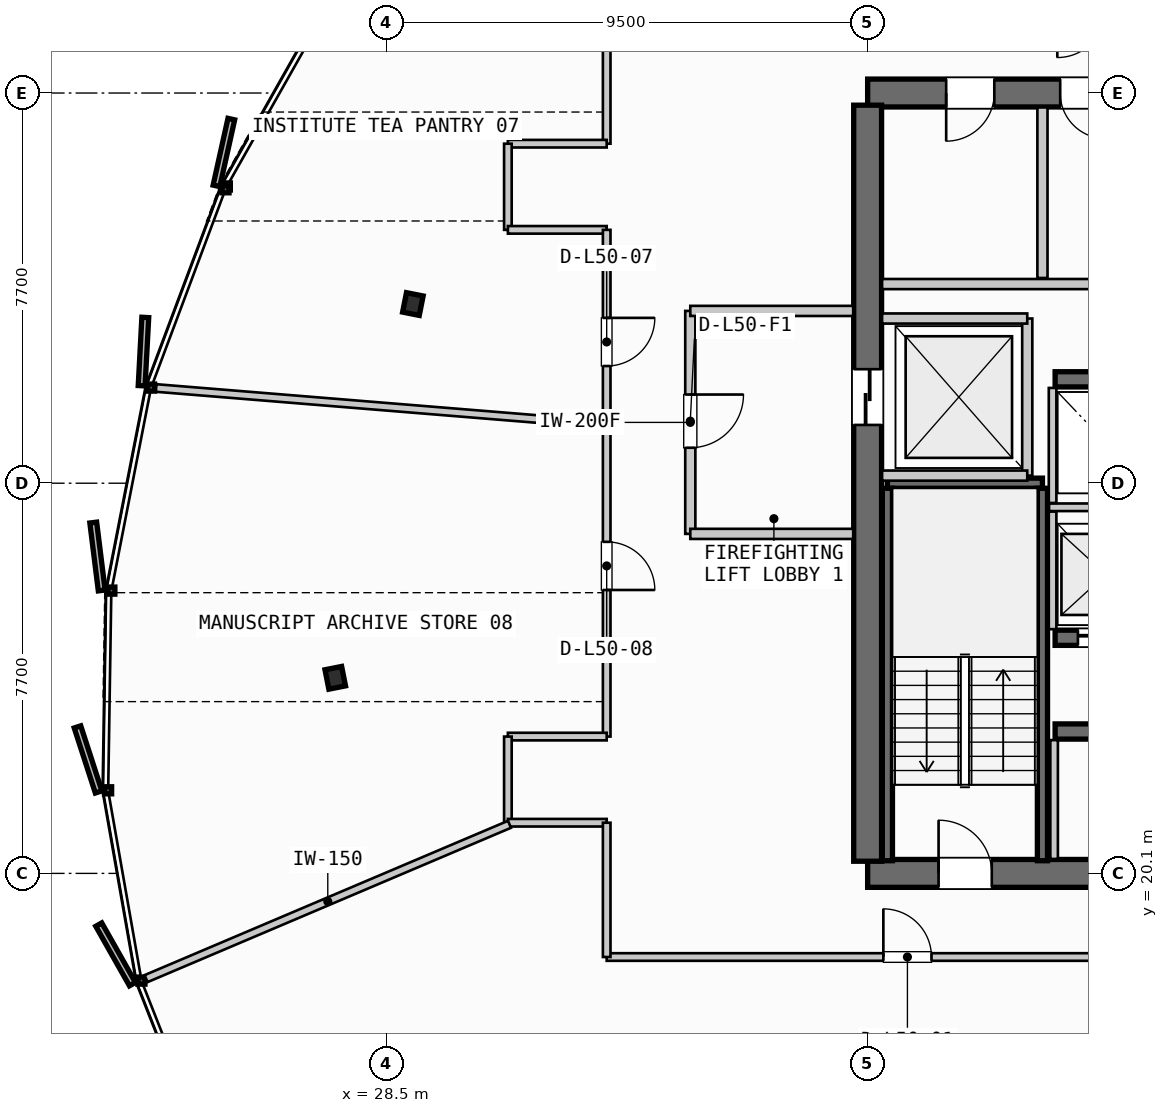
"""IFC4 building model, lengths in metres.
Left out: names, types, materials, properties, quantities, classifications, styles, units other than length and angle.
Written with IfcOpenShell. Run it as: python <this file> out.ifc"""

import sys

from ifc_helpers import new_model, si_unit, direction, frame, frame_2d, origin, origin_2d, place, context, subcontext, project, spatial, rectangle, i_section, extrude, source, transform, mapped, element, fill, save


model = new_model("IFC4")
c1 = context("Model", 3, precision=1e-05, world=origin(), true_north=direction((0.0, 1.0)))
c2 = subcontext(c1, "Body", "Model", "MODEL_VIEW")
j1 = project(units=[si_unit("LENGTHUNIT", "METRE"), si_unit("PLANEANGLEUNIT", "RADIAN")], contexts=[c1])
p1 = place(None, origin())
s1 = spatial("IfcSite", under=j1, at=p1, CompositionType="ELEMENT")
p2 = place(p1, origin())
s2 = spatial("IfcBuilding", under=s1, at=p2, CompositionType="ELEMENT")
p3 = place(p2, frame((0.0, 0.0, 193.9)))
s3 = spatial("IfcBuildingStorey", under=s2, at=p3, CompositionType="ELEMENT", Elevation=193.9)
p4 = place(p3, frame((38.0, 20.1, 0.0), z_axis=(0.0, 0.0, 1.0), x_axis=(1.0, 0.0, 0.0)))
e1 = element("IfcWall", 1, at=p4, inside=s3, PredefinedType="SHEAR", context=c2, shape_type="SweptSolid", body=[
    extrude(rectangle(XDim=17.6, YDim=0.55, at=frame_2d((8.8, 0.0))), origin(), (0.0, 0.0, 1.0), 3.26),
])
p5 = place(p4, frame((1.4, 0.0, 0.0)))
e2 = element("IfcOpeningElement", 2, at=p5, cuts=e1, PredefinedType="OPENING", context=c2, shape_type="SweptSolid", body=[
    extrude(rectangle(XDim=1.05, YDim=2.15, at=frame_2d((0.525, 1.075))), frame((0.0, 0.285, 0.0), z_axis=(0.0, -1.0, 0.0), x_axis=(1.0, 0.0, 0.0)), (0.0, 0.0, 1.0), 0.57),
])
p6 = place(p4, frame((15.15, 0.0, 0.0)))
e3 = element("IfcOpeningElement", 3, at=p6, cuts=e1, PredefinedType="OPENING", context=c2, shape_type="SweptSolid", body=[
    extrude(rectangle(XDim=1.05, YDim=2.15, at=frame_2d((0.525, 1.075))), frame((0.0, 0.285, 0.0), z_axis=(0.0, -1.0, 0.0), x_axis=(1.0, 0.0, 0.0)), (0.0, 0.0, 1.0), 0.57),
])
p7 = place(p4, frame((5.25, 0.0, 0.0)))
e4 = element("IfcOpeningElement", 4, at=p7, cuts=e1, PredefinedType="OPENING", context=c2, shape_type="SweptSolid", body=[
    extrude(rectangle(XDim=0.9, YDim=2.15, at=frame_2d((0.45, 1.075))), frame((0.0, 0.285, 0.0), z_axis=(0.0, -1.0, 0.0), x_axis=(1.0, 0.0, 0.0)), (0.0, 0.0, 1.0), 0.57),
])
p8 = place(p4, frame((11.4, 0.0, 0.0)))
e5 = element("IfcOpeningElement", 5, at=p8, cuts=e1, PredefinedType="OPENING", context=c2, shape_type="SweptSolid", body=[
    extrude(rectangle(XDim=0.95, YDim=2.15, at=frame_2d((0.475, 1.075))), frame((0.0, 0.285, 0.0), z_axis=(0.0, -1.0, 0.0), x_axis=(1.0, 0.0, 0.0)), (0.0, 0.0, 1.0), 0.57),
])
p9 = place(p3, frame((55.6, 35.5, 0.0), z_axis=(0.0, 0.0, 1.0), x_axis=(-1.0, 0.0, 0.0)))
e6 = element("IfcWall", 6, at=p9, inside=s3, PredefinedType="SHEAR", context=c2, shape_type="SweptSolid", body=[
    extrude(rectangle(XDim=17.6, YDim=0.55, at=frame_2d((8.8, 0.0))), origin(), (0.0, 0.0, 1.0), 3.26),
])
p10 = place(p9, frame((8.05, 0.0, 0.0)))
e7 = element("IfcOpeningElement", 7, at=p10, cuts=e6, PredefinedType="OPENING", context=c2, shape_type="SweptSolid", body=[
    extrude(rectangle(XDim=1.5, YDim=2.2, at=frame_2d((0.75, 1.1))), frame((0.0, 0.285, 0.0), z_axis=(0.0, -1.0, 0.0), x_axis=(1.0, 0.0, 0.0)), (0.0, 0.0, 1.0), 0.57),
])
p11 = place(p9, frame((15.1, 0.0, 0.0)))
e8 = element("IfcOpeningElement", 8, at=p11, cuts=e6, PredefinedType="OPENING", context=c2, shape_type="SweptSolid", body=[
    extrude(rectangle(XDim=0.95, YDim=2.15, at=frame_2d((0.475, 1.075))), frame((0.0, 0.285, 0.0), z_axis=(0.0, -1.0, 0.0), x_axis=(1.0, 0.0, 0.0)), (0.0, 0.0, 1.0), 0.57),
])
p12 = place(p9, frame((12.9, 0.0, 0.0)))
e9 = element("IfcOpeningElement", 9, at=p12, cuts=e6, PredefinedType="OPENING", context=c2, shape_type="SweptSolid", body=[
    extrude(rectangle(XDim=0.9, YDim=2.15, at=frame_2d((0.45, 1.075))), frame((0.0, 0.285, 0.0), z_axis=(0.0, -1.0, 0.0), x_axis=(1.0, 0.0, 0.0)), (0.0, 0.0, 1.0), 0.57),
])
p13 = place(p9, frame((10.6, 0.0, 0.0)))
e10 = element("IfcOpeningElement", 10, at=p13, cuts=e6, PredefinedType="OPENING", context=c2, shape_type="SweptSolid", body=[
    extrude(rectangle(XDim=0.95, YDim=2.15, at=frame_2d((0.475, 1.075))), frame((0.0, 0.285, 0.0), z_axis=(0.0, -1.0, 0.0), x_axis=(1.0, 0.0, 0.0)), (0.0, 0.0, 1.0), 0.57),
])
p14 = place(p3, frame((38.0, 35.26, 0.0), z_axis=(0.0, 0.0, 1.0), x_axis=(0.0, -1.0, 0.0)))
e11 = element("IfcWall", 11, at=p14, inside=s3, PredefinedType="SHEAR", context=c2, shape_type="SweptSolid", body=[
    extrude(rectangle(XDim=14.92, YDim=0.55, at=frame_2d((7.46, 0.0))), origin(), (0.0, 0.0, 1.0), 3.26),
])
p15 = place(p14, frame((5.21, 0.0, 0.0)))
e12 = element("IfcOpeningElement", 12, at=p15, cuts=e11, PredefinedType="OPENING", context=c2, shape_type="SweptSolid", body=[
    extrude(rectangle(XDim=1.1, YDim=2.2, at=frame_2d((0.55, 1.1))), frame((0.0, 0.285, 0.0), z_axis=(0.0, -1.0, 0.0), x_axis=(1.0, 0.0, 0.0)), (0.0, 0.0, 1.0), 0.57),
])
p16 = place(p3, frame((41.7, 22.9, 0.0), z_axis=(0.0, 0.0, 1.0), x_axis=(1.0, 0.0, 0.0)))
e13 = element("IfcWall", 13, at=p16, inside=s3, PredefinedType="SHEAR", context=c2, shape_type="SweptSolid", body=[
    extrude(rectangle(XDim=4.25, YDim=0.3, at=frame_2d((2.125, 0.0))), origin(), (0.0, 0.0, 1.0), 3.26),
])
p17 = place(p3, frame((41.7, 24.75, 0.0), z_axis=(0.0, 0.0, 1.0), x_axis=(1.0, 0.0, 0.0)))
e14 = element("IfcWall", 14, at=p17, inside=s3, PredefinedType="SHEAR", context=c2, shape_type="SweptSolid", body=[
    extrude(rectangle(XDim=4.25, YDim=0.3, at=frame_2d((2.125, 0.0))), origin(), (0.0, 0.0, 1.0), 3.26),
])
p18 = place(p17, frame((0.45, 0.0, 0.0)))
e15 = element("IfcOpeningElement", 15, at=p18, cuts=e14, PredefinedType="OPENING", context=c2, shape_type="SweptSolid", body=[
    extrude(rectangle(XDim=1.1, YDim=2.2, at=frame_2d((0.55, 1.1))), frame((0.0, 0.16, 0.0), z_axis=(0.0, -1.0, 0.0), x_axis=(1.0, 0.0, 0.0)), (0.0, 0.0, 1.0), 0.32),
])
p19 = place(p17, frame((2.5, 0.0, 0.0)))
e16 = element("IfcOpeningElement", 16, at=p19, cuts=e14, PredefinedType="OPENING", context=c2, shape_type="SweptSolid", body=[
    extrude(rectangle(XDim=1.1, YDim=2.2, at=frame_2d((0.55, 1.1))), frame((0.0, 0.16, 0.0), z_axis=(0.0, -1.0, 0.0), x_axis=(1.0, 0.0, 0.0)), (0.0, 0.0, 1.0), 0.32),
])
p20 = place(p3, frame((41.7, 29.85, 0.0), z_axis=(0.0, 0.0, 1.0), x_axis=(1.0, 0.0, 0.0)))
e17 = element("IfcWall", 17, at=p20, inside=s3, PredefinedType="SHEAR", context=c2, shape_type="SweptSolid", body=[
    extrude(rectangle(XDim=4.25, YDim=0.3, at=frame_2d((2.125, 0.0))), origin(), (0.0, 0.0, 1.0), 3.26),
])
m1 = source(origin(), c2, "Body", "SweptSolid", [
    extrude(i_section(OverallWidth=0.391, OverallDepth=0.335, WebThickness=0.023, FlangeThickness=0.034, FilletRadius=0.015, at=origin_2d()), origin(), (0.0, 0.0, 1.0), 3.26),
])
for number, where, z_axis, x_axis in (
    (18, (29.025, 31.336, 0.0), (0.0, 0.0, 1.0), (-0.981, 0.195, 0.0)),
    (19, (27.493, 23.96, 0.0), (0.0, 0.0, 1.0), (-0.981, -0.195, 0.0)),
):
    element("IfcColumn", number, at=place(p3, frame(where, z_axis=z_axis, x_axis=x_axis)), inside=s3, PredefinedType="COLUMN", context=c2, shape_type="MappedRepresentation", body=[
        mapped(m1, transform((0.0, 0.0, 0.0), scale=1.0)),
    ])
p21 = place(p3, frame((38.39, 27.8, 0.0), z_axis=(0.0, 0.0, 1.0), x_axis=(1.0, 0.0, 0.0)))
e20 = element("IfcWall", 20, at=p21, inside=s3, PredefinedType="SHEAR", context=c2, shape_type="SweptSolid", body=[
    extrude(rectangle(XDim=3.06, YDim=0.2, at=frame_2d((1.53, 0.0))), origin(), (0.0, 0.0, 1.0), 3.26),
])
for number, where, z_axis, x_axis in (
    (21, (41.45, 27.7, 0.0), (0.0, 0.0, 1.0), (0.0, -1.0, 0.0)),
    (22, (38.39, 20.35, 0.0), (0.0, 0.0, 1.0), (0.0, 1.0, 0.0)),
):
    element("IfcWall", number, at=place(p3, frame(where, z_axis=z_axis, x_axis=x_axis)), inside=s3, PredefinedType="SHEAR", context=c2, shape_type="SweptSolid", body=[
        extrude(rectangle(XDim=7.35, YDim=0.2, at=frame_2d((3.675, 0.0))), origin(), (0.0, 0.0, 1.0), 3.26),
    ])
p22 = place(p3, frame((41.15, 27.95, 0.0), z_axis=(0.0, 0.0, 1.0), x_axis=(0.0, 1.0, 0.0)))
e23 = element("IfcWall", 23, at=p22, inside=s3, PredefinedType="PARTITIONING", context=c2, shape_type="SweptSolid", body=[
    extrude(rectangle(XDim=3.1, YDim=0.2, at=frame_2d((1.55, 0.0))), origin(), (0.0, 0.0, 1.0), 2.735),
])
for number, where, z_axis, x_axis in (
    (24, (38.285, 27.95, 0.0), (0.0, 0.0, 1.0), (1.0, 0.0, 0.0)),
    (25, (38.285, 31.05, 0.0), (0.0, 0.0, 1.0), (1.0, 0.0, 0.0)),
):
    element("IfcWall", number, at=place(p3, frame(where, z_axis=z_axis, x_axis=x_axis)), inside=s3, PredefinedType="PARTITIONING", context=c2, shape_type="SweptSolid", body=[
        extrude(rectangle(XDim=2.865, YDim=0.2, at=frame_2d((1.433, 0.0))), origin(), (0.0, 0.0, 1.0), 2.735),
    ])
p23 = place(p3, frame((34.5, 31.2, 0.0), z_axis=(0.0, 0.0, 1.0), x_axis=(0.0, -1.0, 0.0)))
e26 = element("IfcWall", 26, at=p23, inside=s3, PredefinedType="PARTITIONING", context=c2, shape_type="SweptSolid", body=[
    extrude(rectangle(XDim=4.4, YDim=0.2, at=frame_2d((2.2, 0.0))), origin(), (0.0, 0.0, 1.0), 2.735),
])
p24 = place(p23, frame((1.65, 0.0, 0.0)))
e27 = element("IfcOpeningElement", 27, at=p24, cuts=e26, PredefinedType="OPENING", context=c2, shape_type="SweptSolid", body=[
    extrude(rectangle(XDim=1.05, YDim=2.15, at=frame_2d((0.525, 1.075))), frame((0.0, 0.11, 0.0), z_axis=(0.0, -1.0, 0.0), x_axis=(1.0, 0.0, 0.0)), (0.0, 0.0, 1.0), 0.22),
])
for number, where, z_axis, x_axis in (
    (28, (34.5, 26.8, 0.0), (0.0, 0.0, 1.0), (1.0, 0.0, 0.0)),
    (29, (34.5, 31.2, 0.0), (0.0, 0.0, 1.0), (1.0, 0.0, 0.0)),
):
    element("IfcWall", number, at=place(p3, frame(where, z_axis=z_axis, x_axis=x_axis)), inside=s3, PredefinedType="PARTITIONING", context=c2, shape_type="SweptSolid", body=[
        extrude(rectangle(XDim=3.215, YDim=0.2, at=frame_2d((1.607, 0.0))), origin(), (0.0, 0.0, 1.0), 2.735),
    ])
p25 = place(p3, frame((41.68, 20.385, 0.0), z_axis=(0.0, 0.0, 1.0), x_axis=(0.0, 1.0, 0.0)))
e30 = element("IfcWall", 30, at=p25, inside=s3, PredefinedType="PARTITIONING", context=c2, shape_type="SweptSolid", body=[
    extrude(rectangle(XDim=2.345, YDim=0.15, at=frame_2d((1.172, 0.0))), origin(), (0.0, 0.0, 1.0), 2.735),
])
p26 = place(p3, frame((41.58, 27.325, 0.0), z_axis=(0.0, 0.0, 1.0), x_axis=(1.0, 0.0, 0.0)))
e31 = element("IfcWall", 31, at=p26, inside=s3, PredefinedType="PARTITIONING", context=c2, shape_type="SweptSolid", body=[
    extrude(rectangle(XDim=4.32, YDim=0.15, at=frame_2d((2.16, 0.0))), origin(), (0.0, 0.0, 1.0), 2.735),
])
p27 = place(p3, frame((41.65, 24.92, 0.0), z_axis=(0.0, 0.0, 1.0), x_axis=(0.0, 1.0, 0.0)))
e32 = element("IfcWall", 32, at=p27, inside=s3, PredefinedType="PARTITIONING", context=c2, shape_type="SweptSolid", body=[
    extrude(rectangle(XDim=2.32, YDim=0.15, at=frame_2d((1.16, 0.0))), origin(), (0.0, 0.0, 1.0), 2.735),
])
p28 = place(p3, frame((41.65, 27.41, 0.0), z_axis=(0.0, 0.0, 1.0), x_axis=(0.0, 1.0, 0.0)))
e33 = element("IfcWall", 33, at=p28, inside=s3, PredefinedType="PARTITIONING", context=c2, shape_type="SweptSolid", body=[
    extrude(rectangle(XDim=2.27, YDim=0.15, at=frame_2d((1.135, 0.0))), origin(), (0.0, 0.0, 1.0), 2.735),
])
p29 = place(p3, frame((41.45, 31.85, 0.0), z_axis=(0.0, 0.0, 1.0), x_axis=(0.0, 1.0, 0.0)))
e34 = element("IfcWall", 34, at=p29, inside=s3, PredefinedType="PARTITIONING", context=c2, shape_type="SweptSolid", body=[
    extrude(rectangle(XDim=3.365, YDim=0.2, at=frame_2d((1.683, 0.0))), origin(), (0.0, 0.0, 1.0), 2.735),
])
p30 = place(p3, frame((38.285, 31.73, 0.0), z_axis=(0.0, 0.0, 1.0), x_axis=(1.0, 0.0, 0.0)))
e35 = element("IfcWall", 35, at=p30, inside=s3, PredefinedType="PARTITIONING", context=c2, shape_type="SweptSolid", body=[
    extrude(rectangle(XDim=7.515, YDim=0.2, at=frame_2d((3.758, 0.0))), origin(), (0.0, 0.0, 1.0), 2.735),
])
p31 = place(p3, frame((32.85, 18.45, 0.0), z_axis=(0.0, 0.0, 1.0), x_axis=(1.0, 0.0, 0.0)))
e36 = element("IfcWall", 36, at=p31, inside=s3, PredefinedType="PARTITIONING", context=c2, shape_type="SweptSolid", body=[
    extrude(rectangle(XDim=28.35, YDim=0.15, at=frame_2d((14.175, 0.0))), origin(), (0.0, 0.0, 1.0), 2.735),
])
p32 = place(p31, frame((5.46, 0.0, 0.0)))
e37 = element("IfcOpeningElement", 37, at=p32, cuts=e36, PredefinedType="OPENING", context=c2, shape_type="SweptSolid", body=[
    extrude(rectangle(XDim=0.95, YDim=2.15, at=frame_2d((0.475, 1.075))), frame((0.0, 0.085, 0.0), z_axis=(0.0, -1.0, 0.0), x_axis=(1.0, 0.0, 0.0)), (0.0, 0.0, 1.0), 0.17),
])
p33 = place(p31, frame((18.165, 0.0, 0.0)))
e38 = element("IfcOpeningElement", 38, at=p33, cuts=e36, PredefinedType="OPENING", context=c2, shape_type="SweptSolid", body=[
    extrude(rectangle(XDim=0.95, YDim=2.15, at=frame_2d((0.475, 1.075))), frame((0.0, 0.085, 0.0), z_axis=(0.0, -1.0, 0.0), x_axis=(1.0, 0.0, 0.0)), (0.0, 0.0, 1.0), 0.17),
])
p34 = place(p3, frame((32.85, 37.15, 0.0), z_axis=(0.0, 0.0, 1.0), x_axis=(0.0, -1.0, 0.0)))
e39 = element("IfcWall", 39, at=p34, inside=s3, PredefinedType="PARTITIONING", context=c2, shape_type="SweptSolid", body=[
    extrude(rectangle(XDim=2.65, YDim=0.15, at=frame_2d((1.325, 0.0))), origin(), (0.0, 0.0, 1.0), 2.735),
])
p35 = place(p3, frame((32.85, 34.5, 0.0), z_axis=(0.0, 0.0, 1.0), x_axis=(-1.0, 0.0, 0.0)))
e40 = element("IfcWall", 40, at=p35, inside=s3, PredefinedType="PARTITIONING", context=c2, shape_type="SweptSolid", body=[
    extrude(rectangle(XDim=1.95, YDim=0.15, at=frame_2d((0.975, 0.0))), origin(), (0.0, 0.0, 1.0), 2.735),
])
p36 = place(p3, frame((30.9, 34.5, 0.0), z_axis=(0.0, 0.0, 1.0), x_axis=(0.0, -1.0, 0.0)))
e41 = element("IfcWall", 41, at=p36, inside=s3, PredefinedType="PARTITIONING", context=c2, shape_type="SweptSolid", body=[
    extrude(rectangle(XDim=1.7, YDim=0.15, at=frame_2d((0.85, 0.0))), origin(), (0.0, 0.0, 1.0), 2.735),
])
p37 = place(p3, frame((30.9, 32.8, 0.0), z_axis=(0.0, 0.0, 1.0), x_axis=(1.0, 0.0, 0.0)))
e42 = element("IfcWall", 42, at=p37, inside=s3, PredefinedType="PARTITIONING", context=c2, shape_type="SweptSolid", body=[
    extrude(rectangle(XDim=1.95, YDim=0.15, at=frame_2d((0.975, 0.0))), origin(), (0.0, 0.0, 1.0), 2.735),
])
p38 = place(p3, frame((32.85, 32.8, 0.0), z_axis=(0.0, 0.0, 1.0), x_axis=(0.0, -1.0, 0.0)))
e43 = element("IfcWall", 43, at=p38, inside=s3, PredefinedType="PARTITIONING", context=c2, shape_type="SweptSolid", body=[
    extrude(rectangle(XDim=10.0, YDim=0.15, at=frame_2d((5.0, 0.0))), origin(), (0.0, 0.0, 1.0), 2.735),
])
p39 = place(p38, frame((1.738, 0.0, 0.0)))
e44 = element("IfcOpeningElement", 44, at=p39, cuts=e43, PredefinedType="OPENING", context=c2, shape_type="SweptSolid", body=[
    extrude(rectangle(XDim=0.95, YDim=2.15, at=frame_2d((0.475, 1.075))), frame((0.0, 0.085, 0.0), z_axis=(0.0, -1.0, 0.0), x_axis=(1.0, 0.0, 0.0)), (0.0, 0.0, 1.0), 0.17),
])
p40 = place(p38, frame((6.157, 0.0, 0.0)))
e45 = element("IfcOpeningElement", 45, at=p40, cuts=e43, PredefinedType="OPENING", context=c2, shape_type="SweptSolid", body=[
    extrude(rectangle(XDim=0.95, YDim=2.15, at=frame_2d((0.475, 1.075))), frame((0.0, 0.085, 0.0), z_axis=(0.0, -1.0, 0.0), x_axis=(1.0, 0.0, 0.0)), (0.0, 0.0, 1.0), 0.17),
])
p41 = place(p3, frame((32.85, 22.8, 0.0), z_axis=(0.0, 0.0, 1.0), x_axis=(-1.0, 0.0, 0.0)))
e46 = element("IfcWall", 46, at=p41, inside=s3, PredefinedType="PARTITIONING", context=c2, shape_type="SweptSolid", body=[
    extrude(rectangle(XDim=1.95, YDim=0.15, at=frame_2d((0.975, 0.0))), origin(), (0.0, 0.0, 1.0), 2.735),
])
p42 = place(p3, frame((30.9, 22.8, 0.0), z_axis=(0.0, 0.0, 1.0), x_axis=(0.0, -1.0, 0.0)))
e47 = element("IfcWall", 47, at=p42, inside=s3, PredefinedType="PARTITIONING", context=c2, shape_type="SweptSolid", body=[
    extrude(rectangle(XDim=1.7, YDim=0.15, at=frame_2d((0.85, 0.0))), origin(), (0.0, 0.0, 1.0), 2.735),
])
p43 = place(p3, frame((30.9, 21.1, 0.0), z_axis=(0.0, 0.0, 1.0), x_axis=(1.0, 0.0, 0.0)))
e48 = element("IfcWall", 48, at=p43, inside=s3, PredefinedType="PARTITIONING", context=c2, shape_type="SweptSolid", body=[
    extrude(rectangle(XDim=1.95, YDim=0.15, at=frame_2d((0.975, 0.0))), origin(), (0.0, 0.0, 1.0), 2.735),
])
p44 = place(p3, frame((32.85, 21.1, 0.0), z_axis=(0.0, 0.0, 1.0), x_axis=(0.0, -1.0, 0.0)))
e49 = element("IfcWall", 49, at=p44, inside=s3, PredefinedType="PARTITIONING", context=c2, shape_type="SweptSolid", body=[
    extrude(rectangle(XDim=2.65, YDim=0.15, at=frame_2d((1.325, 0.0))), origin(), (0.0, 0.0, 1.0), 2.735),
])
p45 = place(p3, frame((30.932, 21.069, 0.0), z_axis=(0.0, 0.0, 1.0), x_axis=(-0.920468749574, -0.390816172973, 0.0)))
e50 = element("IfcWall", 50, at=p45, inside=s3, PredefinedType="PARTITIONING", context=c2, shape_type="SweptSolid", body=[
    extrude(rectangle(XDim=7.792, YDim=0.15, at=frame_2d((3.896, 0.0))), origin(), (0.0, 0.0, 1.0), 2.735),
])
p46 = place(p3, frame((44.119, 18.373, 0.0), z_axis=(0.0, 0.0, 1.0), x_axis=(-0.275658924293, -0.961255511015, 0.0)))
e51 = element("IfcWall", 51, at=p46, inside=s3, PredefinedType="PARTITIONING", context=c2, shape_type="SweptSolid", body=[
    extrude(rectangle(XDim=13.924, YDim=0.15, at=frame_2d((6.962, 0.0))), origin(), (0.0, 0.0, 1.0), 2.735),
])
p47 = place(p3, frame((32.77, 28.961, 0.0), z_axis=(0.0, 0.0, 1.0), x_axis=(-0.996701457141, 0.081155439328, 0.0)))
e52 = element("IfcWall", 52, at=p47, inside=s3, PredefinedType="PARTITIONING", context=c2, shape_type="SweptSolid", body=[
    extrude(rectangle(XDim=8.841, YDim=0.15, at=frame_2d((4.421, 0.0))), origin(), (0.0, 0.0, 1.0), 2.735),
])
m2 = source(origin(), c2, "Body", "SweptSolid", [
    extrude(rectangle(XDim=1.05, YDim=2.15, at=frame_2d((0.525, 1.075))), frame((0.0, 0.025, 0.0), z_axis=(0.0, -1.0, 0.0), x_axis=(1.0, 0.0, 0.0)), (0.0, 0.0, 1.0), 0.05),
])
p48 = place(p5, origin())
e53 = element("IfcDoor", 53, at=p48, inside=s3, OperationType="SINGLE_SWING_LEFT", PredefinedType="DOOR", context=c2, shape_type="MappedRepresentation", body=[
    mapped(m2, transform((0.0, 0.0, 0.0), scale=1.0)),
])
fill(e2, e53)
m3 = source(origin(), c2, "Body", "SweptSolid", [
    extrude(rectangle(XDim=1.1, YDim=2.2, at=frame_2d((0.55, 1.1))), frame((0.0, 0.025, 0.0), z_axis=(0.0, -1.0, 0.0), x_axis=(1.0, 0.0, 0.0)), (0.0, 0.0, 1.0), 0.05),
])
p49 = place(p15, origin())
e54 = element("IfcDoor", 54, at=p49, inside=s3, OperationType="SLIDING_TO_LEFT", PredefinedType="DOOR", context=c2, shape_type="MappedRepresentation", body=[
    mapped(m3, transform((0.0, 0.0, 0.0), scale=1.0)),
])
fill(e12, e54)
p50 = place(p18, origin())
e55 = element("IfcDoor", 55, at=p50, inside=s3, OperationType="SLIDING_TO_RIGHT", PredefinedType="DOOR", context=c2, shape_type="MappedRepresentation", body=[
    mapped(m3, transform((0.0, 0.0, 0.0), scale=1.0)),
])
fill(e15, e55)
m4 = source(origin(), c2, "Body", "SweptSolid", [
    extrude(rectangle(XDim=0.95, YDim=2.15, at=frame_2d((0.475, 1.075))), frame((0.0, 0.025, 0.0), z_axis=(0.0, -1.0, 0.0), x_axis=(1.0, 0.0, 0.0)), (0.0, 0.0, 1.0), 0.05),
])
p51 = place(p11, origin())
e56 = element("IfcDoor", 56, at=p51, inside=s3, OperationType="SINGLE_SWING_RIGHT", PredefinedType="DOOR", context=c2, shape_type="MappedRepresentation", body=[
    mapped(m4, transform((0.0, 0.0, 0.0), scale=1.0)),
])
fill(e8, e56)
m5 = source(origin(), c2, "Body", "SweptSolid", [
    extrude(rectangle(XDim=0.9, YDim=2.15, at=frame_2d((0.45, 1.075))), frame((0.0, 0.025, 0.0), z_axis=(0.0, -1.0, 0.0), x_axis=(1.0, 0.0, 0.0)), (0.0, 0.0, 1.0), 0.05),
])
p52 = place(p12, origin())
e57 = element("IfcDoor", 57, at=p52, inside=s3, OperationType="SINGLE_SWING_LEFT", PredefinedType="DOOR", context=c2, shape_type="MappedRepresentation", body=[
    mapped(m5, transform((0.0, 0.0, 0.0), scale=1.0)),
])
fill(e9, e57)
p53 = place(p24, origin())
e58 = element("IfcDoor", 58, at=p53, inside=s3, OperationType="SINGLE_SWING_LEFT", PredefinedType="DOOR", context=c2, shape_type="MappedRepresentation", body=[
    mapped(m2, transform((0.0, 0.0, 0.0), scale=1.0)),
])
fill(e27, e58)
p54 = place(p32, origin())
e59 = element("IfcDoor", 59, at=p54, inside=s3, OperationType="SINGLE_SWING_LEFT", PredefinedType="DOOR", context=c2, shape_type="MappedRepresentation", body=[
    mapped(m4, transform((0.0, 0.0, 0.0), scale=1.0)),
])
fill(e37, e59)
p55 = place(p39, origin())
e60 = element("IfcDoor", 60, at=p55, inside=s3, OperationType="SINGLE_SWING_LEFT", PredefinedType="DOOR", context=c2, shape_type="MappedRepresentation", body=[
    mapped(m4, transform((0.0, 0.0, 0.0), scale=1.0)),
])
fill(e44, e60)
p56 = place(p40, origin())
e61 = element("IfcDoor", 61, at=p56, inside=s3, OperationType="SINGLE_SWING_RIGHT", PredefinedType="DOOR", context=c2, shape_type="MappedRepresentation", body=[
    mapped(m4, transform((0.0, 0.0, 0.0), scale=1.0)),
])
fill(e45, e61)
save(model, sys.argv[1])
